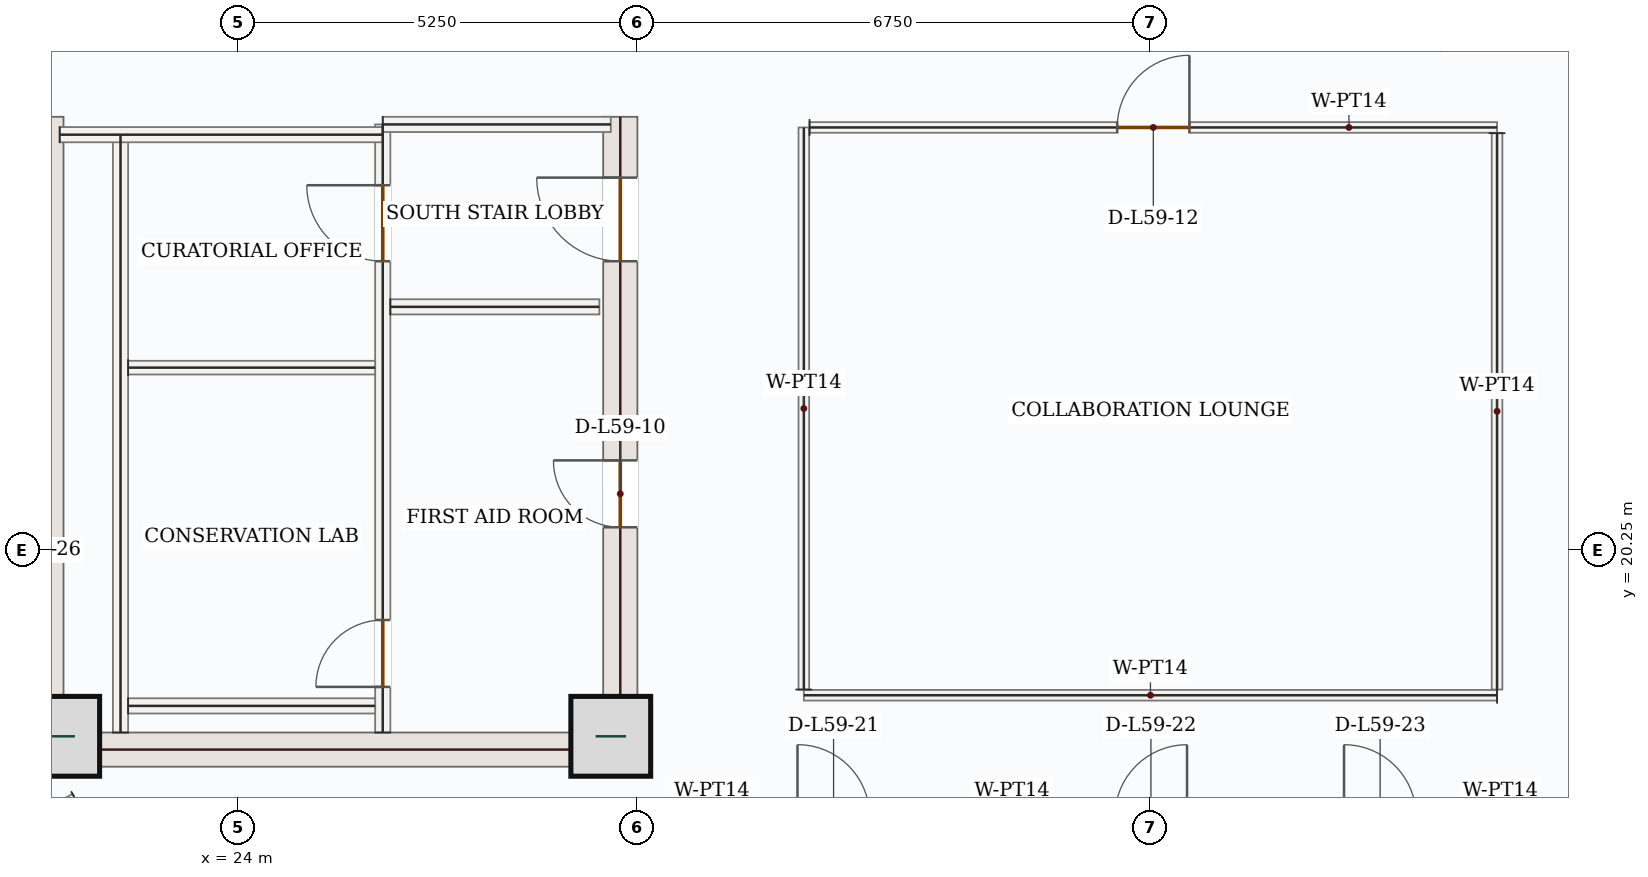
"""IFC4 building model, lengths in metres.
Left out: names, types, materials, properties, quantities, classifications, styles, units other than length and angle.
Written with IfcOpenShell. Run it as: python <this file> out.ifc"""

import sys

from ifc_helpers import new_model, si_unit, direction, frame, frame_2d, origin, origin_2d, place, context, subcontext, project, spatial, rectangle, extrude, source, transform, mapped, element, fill, save


model = new_model("IFC4")
c1 = context("Model", 3, precision=1e-05, world=origin(), true_north=direction((0.0, 1.0)))
c2 = subcontext(c1, "Body", "Model", "MODEL_VIEW")
j1 = project(units=[si_unit("LENGTHUNIT", "METRE"), si_unit("PLANEANGLEUNIT", "RADIAN")], contexts=[c1])
p1 = place(None, origin())
s1 = spatial("IfcSite", under=j1, at=p1, CompositionType="ELEMENT")
p2 = place(p1, origin())
s2 = spatial("IfcBuilding", under=s1, at=p2, CompositionType="ELEMENT")
p3 = place(p2, frame((0.0, 0.0, 250.35)))
s3 = spatial("IfcBuildingStorey", under=s2, at=p3, CompositionType="ELEMENT", Elevation=250.35)
m1 = source(origin(), c2, "Body", "SweptSolid", [
    extrude(rectangle(XDim=8.55, YDim=0.45, at=frame_2d((4.275, 0.0))), origin(), (0.0, 0.0, 1.0), 3.5),
])
p4 = place(p3, frame((21.475, 17.4, 0.0), z_axis=(0.0, 0.0, 1.0), x_axis=(0.0, 1.0, 0.0)))
e1 = element("IfcWall", 1, at=p4, inside=s3, PredefinedType="SHEAR", context=c2, shape_type="MappedRepresentation", body=[
    mapped(m1, transform((0.0, 0.0, 0.0), x_axis=(1.0, 0.0, 0.0), y_axis=(0.0, 1.0, 0.0), z_axis=(0.0, 0.0, 1.0), scale=1.0)),
])
p5 = place(p3, frame((29.025, 17.4, 0.0), z_axis=(0.0, 0.0, 1.0), x_axis=(0.0, 1.0, 0.0)))
e2 = element("IfcWall", 2, at=p5, inside=s3, PredefinedType="SHEAR", context=c2, shape_type="SweptSolid", body=[
    extrude(rectangle(XDim=8.55, YDim=0.45, at=frame_2d((4.275, 0.0))), origin(), (0.0, 0.0, 1.0), 3.5),
])
p6 = place(p5, frame((6.65, 0.0, 0.0)))
e3 = element("IfcOpeningElement", 3, at=p6, cuts=e2, PredefinedType="OPENING", context=c2, shape_type="SweptSolid", body=[
    extrude(rectangle(XDim=1.1, YDim=2.2, at=frame_2d((0.55, 1.1))), frame((0.0, 0.235, 0.0), z_axis=(0.0, -1.0, 0.0), x_axis=(1.0, 0.0, 0.0)), (0.0, 0.0, 1.0), 0.47),
])
p7 = place(p5, frame((3.15, 0.0, 0.0)))
e4 = element("IfcOpeningElement", 4, at=p7, cuts=e2, PredefinedType="OPENING", context=c2, shape_type="SweptSolid", body=[
    extrude(rectangle(XDim=0.88, YDim=2.1, at=frame_2d((0.44, 1.05))), frame((0.0, 0.235, 0.0), z_axis=(0.0, -1.0, 0.0), x_axis=(1.0, 0.0, 0.0)), (0.0, 0.0, 1.0), 0.47),
])
m2 = source(origin(), c2, "Body", "SweptSolid", [
    extrude(rectangle(XDim=7.1, YDim=0.45, at=frame_2d((3.55, 0.0))), origin(), (0.0, 0.0, 1.0), 3.5),
])
p8 = place(p3, frame((21.7, 17.625, 0.0), z_axis=(0.0, 0.0, 1.0), x_axis=(1.0, 0.0, 0.0)))
e5 = element("IfcWall", 5, at=p8, inside=s3, PredefinedType="SHEAR", context=c2, shape_type="MappedRepresentation", body=[
    mapped(m2, transform((0.0, 0.0, 0.0), x_axis=(1.0, 0.0, 0.0), y_axis=(0.0, 1.0, 0.0), z_axis=(0.0, 0.0, 1.0), scale=1.0)),
])
m3 = source(origin(), c2, "Body", "SweptSolid", [
    extrude(rectangle(XDim=1.05, YDim=1.05, at=origin_2d()), origin(), (0.0, 0.0, 1.0), 3.75),
])
for number, where, z_axis, x_axis in (
    (6, (21.65, 17.8, 0.0), (0.0, 0.0, 1.0), (1.0, 0.0, 0.0)),
    (7, (28.9, 17.8, 0.0), (0.0, 0.0, 1.0), (1.0, 0.0, 0.0)),
):
    element("IfcColumn", number, at=place(p3, frame(where, z_axis=z_axis, x_axis=x_axis)), inside=s3, PredefinedType="COLUMN", context=c2, shape_type="MappedRepresentation", body=[
        mapped(m3, transform((0.0, 0.0, 0.0), x_axis=(1.0, 0.0, 0.0), y_axis=(0.0, 1.0, 0.0), z_axis=(0.0, 0.0, 1.0), scale=1.0)),
    ])
m4 = source(origin(), c2, "Body", "SweptSolid", [
    extrude(rectangle(XDim=7.87, YDim=0.2, at=frame_2d((3.935, 0.0))), origin(), (0.0, 0.0, 1.0), 3.5),
])
p9 = place(p3, frame((22.45, 17.85, 0.0), z_axis=(0.0, 0.0, 1.0), x_axis=(0.0, 1.0, 0.0)))
e8 = element("IfcWall", 8, at=p9, inside=s3, PredefinedType="SOLIDWALL", context=c2, shape_type="MappedRepresentation", body=[
    mapped(m4, transform((0.0, 0.0, 0.0), x_axis=(1.0, 0.0, 0.0), y_axis=(0.0, 1.0, 0.0), z_axis=(0.0, 0.0, 1.0), scale=1.0)),
])
p10 = place(p3, frame((25.9, 17.85, 0.0), z_axis=(0.0, 0.0, 1.0), x_axis=(0.0, 1.0, 0.0)))
e9 = element("IfcWall", 9, at=p10, inside=s3, PredefinedType="SOLIDWALL", context=c2, shape_type="SweptSolid", body=[
    extrude(rectangle(XDim=8.0, YDim=0.2, at=frame_2d((4.0, 0.0))), origin(), (0.0, 0.0, 1.0), 3.5),
])
p11 = place(p10, frame((6.2, 0.0, 0.0)))
e10 = element("IfcOpeningElement", 10, at=p11, cuts=e9, PredefinedType="OPENING", context=c2, shape_type="SweptSolid", body=[
    extrude(rectangle(XDim=1.0, YDim=2.15, at=frame_2d((0.5, 1.075))), frame((0.0, 0.11, 0.0), z_axis=(0.0, -1.0, 0.0), x_axis=(1.0, 0.0, 0.0)), (0.0, 0.0, 1.0), 0.22),
])
p12 = place(p10, frame((0.6, 0.0, 0.0)))
e11 = element("IfcOpeningElement", 11, at=p12, cuts=e9, PredefinedType="OPENING", context=c2, shape_type="SweptSolid", body=[
    extrude(rectangle(XDim=0.88, YDim=2.1, at=frame_2d((0.44, 1.05))), frame((0.0, 0.11, 0.0), z_axis=(0.0, -1.0, 0.0), x_axis=(1.0, 0.0, 0.0)), (0.0, 0.0, 1.0), 0.22),
])
m5 = source(origin(), c2, "Body", "SweptSolid", [
    extrude(rectangle(XDim=4.25, YDim=0.2, at=frame_2d((2.125, 0.0))), origin(), (0.0, 0.0, 1.0), 3.5),
])
p13 = place(p3, frame((21.65, 25.715, 0.0), z_axis=(0.0, 0.0, 1.0), x_axis=(1.0, 0.0, 0.0)))
e12 = element("IfcWall", 12, at=p13, inside=s3, PredefinedType="SOLIDWALL", context=c2, shape_type="MappedRepresentation", body=[
    mapped(m5, transform((0.0, 0.0, 0.0), x_axis=(1.0, 0.0, 0.0), y_axis=(0.0, 1.0, 0.0), z_axis=(0.0, 0.0, 1.0), scale=1.0)),
])
m6 = source(origin(), c2, "Body", "SweptSolid", [
    extrude(rectangle(XDim=3.0, YDim=0.2, at=frame_2d((1.5, 0.0))), origin(), (0.0, 0.0, 1.0), 3.5),
])
p14 = place(p3, frame((25.9, 25.85, 0.0), z_axis=(0.0, 0.0, 1.0), x_axis=(1.0, 0.0, 0.0)))
e13 = element("IfcWall", 13, at=p14, inside=s3, PredefinedType="SOLIDWALL", context=c2, shape_type="MappedRepresentation", body=[
    mapped(m6, transform((0.0, 0.0, 0.0), x_axis=(1.0, 0.0, 0.0), y_axis=(0.0, 1.0, 0.0), z_axis=(0.0, 0.0, 1.0), scale=1.0)),
])
m7 = source(origin(), c2, "Body", "SweptSolid", [
    extrude(rectangle(XDim=3.25, YDim=0.2, at=frame_2d((1.625, 0.0))), origin(), (0.0, 0.0, 1.0), 3.5),
])
p15 = place(p3, frame((22.55, 18.2, 0.0), z_axis=(0.0, 0.0, 1.0), x_axis=(1.0, 0.0, 0.0)))
e14 = element("IfcWall", 14, at=p15, inside=s3, PredefinedType="SOLIDWALL", context=c2, shape_type="MappedRepresentation", body=[
    mapped(m7, transform((0.0, 0.0, 0.0), x_axis=(1.0, 0.0, 0.0), y_axis=(0.0, 1.0, 0.0), z_axis=(0.0, 0.0, 1.0), scale=1.0)),
])
m8 = source(origin(), c2, "Body", "SweptSolid", [
    extrude(rectangle(XDim=3.25, YDim=0.18, at=frame_2d((1.625, 0.0))), origin(), (0.0, 0.0, 1.0), 3.5),
])
p16 = place(p3, frame((22.55, 22.65, 0.0), z_axis=(0.0, 0.0, 1.0), x_axis=(1.0, 0.0, 0.0)))
e15 = element("IfcWall", 15, at=p16, inside=s3, PredefinedType="PARTITIONING", context=c2, shape_type="MappedRepresentation", body=[
    mapped(m8, transform((0.0, 0.0, 0.0), x_axis=(1.0, 0.0, 0.0), y_axis=(0.0, 1.0, 0.0), z_axis=(0.0, 0.0, 1.0), scale=1.0)),
])
m9 = source(origin(), c2, "Body", "SweptSolid", [
    extrude(rectangle(XDim=2.75, YDim=0.2, at=frame_2d((1.375, 0.0))), origin(), (0.0, 0.0, 1.0), 3.5),
])
p17 = place(p3, frame((26.0, 23.45, 0.0), z_axis=(0.0, 0.0, 1.0), x_axis=(1.0, 0.0, 0.0)))
e16 = element("IfcWall", 16, at=p17, inside=s3, PredefinedType="SOLIDWALL", context=c2, shape_type="MappedRepresentation", body=[
    mapped(m9, transform((0.0, 0.0, 0.0), x_axis=(1.0, 0.0, 0.0), y_axis=(0.0, 1.0, 0.0), z_axis=(0.0, 0.0, 1.0), scale=1.0)),
])
m10 = source(origin(), c2, "Body", "SweptSolid", [
    extrude(rectangle(XDim=4.695, YDim=0.14, at=frame_2d((2.348, 0.0))), origin(), (0.0, 0.0, 1.0), 3.5),
])
p18 = place(p3, frame((21.852, 16.98, 0.0), z_axis=(0.0, 0.0, 1.0), x_axis=(-0.877559526902, -0.479467701461, 0.0)))
e17 = element("IfcWall", 17, at=p18, inside=s3, PredefinedType="PARTITIONING", context=c2, shape_type="MappedRepresentation", body=[
    mapped(m10, transform((0.0, 0.0, 0.0), x_axis=(1.0, 0.0, 0.0), y_axis=(0.0, 1.0, 0.0), z_axis=(0.0, 0.0, 1.0), scale=1.0)),
])
m11 = source(origin(), c2, "Body", "SweptSolid", [
    extrude(rectangle(XDim=9.12, YDim=0.14, at=frame_2d((4.56, 0.0))), origin(), (0.0, 0.0, 1.0), 3.5),
])
p19 = place(p3, frame((40.56, 18.34, 0.0), z_axis=(0.0, 0.0, 1.0), x_axis=(-1.0, 0.0, 0.0)))
e18 = element("IfcWall", 18, at=p19, inside=s3, PredefinedType="PARTITIONING", context=c2, shape_type="MappedRepresentation", body=[
    mapped(m11, transform((0.0, 0.0, 0.0), x_axis=(1.0, 0.0, 0.0), y_axis=(0.0, 1.0, 0.0), z_axis=(0.0, 0.0, 1.0), scale=1.0)),
])
m12 = source(origin(), c2, "Body", "SweptSolid", [
    extrude(rectangle(XDim=7.395, YDim=0.14, at=frame_2d((3.698, 0.0))), origin(), (0.0, 0.0, 1.0), 3.5),
])
p20 = place(p3, frame((31.44, 18.415, 0.0), z_axis=(0.0, 0.0, 1.0), x_axis=(0.0, 1.0, 0.0)))
e19 = element("IfcWall", 19, at=p20, inside=s3, PredefinedType="PARTITIONING", context=c2, shape_type="MappedRepresentation", body=[
    mapped(m12, transform((0.0, 0.0, 0.0), x_axis=(1.0, 0.0, 0.0), y_axis=(0.0, 1.0, 0.0), z_axis=(0.0, 0.0, 1.0), scale=1.0)),
])
p21 = place(p3, frame((31.515, 25.81, 0.0), z_axis=(0.0, 0.0, 1.0), x_axis=(1.0, 0.0, 0.0)))
e20 = element("IfcWall", 20, at=p21, inside=s3, PredefinedType="PARTITIONING", context=c2, shape_type="SweptSolid", body=[
    extrude(rectangle(XDim=9.045, YDim=0.14, at=frame_2d((4.522, 0.0))), origin(), (0.0, 0.0, 1.0), 3.5),
])
p22 = place(p21, frame((4.048, 0.0, 0.0)))
e21 = element("IfcOpeningElement", 21, at=p22, cuts=e20, PredefinedType="OPENING", context=c2, shape_type="SweptSolid", body=[
    extrude(rectangle(XDim=0.95, YDim=2.15, at=frame_2d((0.475, 1.075))), frame((0.0, 0.08, 0.0), z_axis=(0.0, -1.0, 0.0), x_axis=(1.0, 0.0, 0.0)), (0.0, 0.0, 1.0), 0.16),
])
m13 = source(origin(), c2, "Body", "SweptSolid", [
    extrude(rectangle(XDim=7.32, YDim=0.14, at=frame_2d((3.66, 0.0))), origin(), (0.0, 0.0, 1.0), 3.5),
])
p23 = place(p3, frame((40.56, 25.735, 0.0), z_axis=(0.0, 0.0, 1.0), x_axis=(0.0, -1.0, 0.0)))
e22 = element("IfcWall", 22, at=p23, inside=s3, PredefinedType="PARTITIONING", context=c2, shape_type="MappedRepresentation", body=[
    mapped(m13, transform((0.0, 0.0, 0.0), x_axis=(1.0, 0.0, 0.0), y_axis=(0.0, 1.0, 0.0), z_axis=(0.0, 0.0, 1.0), scale=1.0)),
])
m14 = source(origin(), c2, "Body", "SweptSolid", [
    extrude(rectangle(XDim=1.0, YDim=2.15, at=frame_2d((0.5, 1.075))), frame((0.0, 0.025, 0.0), z_axis=(0.0, -1.0, 0.0), x_axis=(1.0, 0.0, 0.0)), (0.0, 0.0, 1.0), 0.05),
])
p24 = place(p11, origin())
e23 = element("IfcDoor", 23, at=p24, inside=s3, OperationType="SINGLE_SWING_RIGHT", PredefinedType="DOOR", context=c2, shape_type="MappedRepresentation", body=[
    mapped(m14, transform((0.0, 0.0, 0.0), x_axis=(1.0, 0.0, 0.0), y_axis=(0.0, 1.0, 0.0), z_axis=(0.0, 0.0, 1.0), scale=1.0)),
])
fill(e10, e23)
m15 = source(origin(), c2, "Body", "SweptSolid", [
    extrude(rectangle(XDim=0.88, YDim=2.1, at=frame_2d((0.44, 1.05))), frame((0.0, 0.025, 0.0), z_axis=(0.0, -1.0, 0.0), x_axis=(1.0, 0.0, 0.0)), (0.0, 0.0, 1.0), 0.05),
])
p25 = place(p12, origin())
e24 = element("IfcDoor", 24, at=p25, inside=s3, OperationType="SINGLE_SWING_LEFT", PredefinedType="DOOR", context=c2, shape_type="MappedRepresentation", body=[
    mapped(m15, transform((0.0, 0.0, 0.0), x_axis=(1.0, 0.0, 0.0), y_axis=(0.0, 1.0, 0.0), z_axis=(0.0, 0.0, 1.0), scale=1.0)),
])
fill(e11, e24)
m16 = source(origin(), c2, "Body", "SweptSolid", [
    extrude(rectangle(XDim=1.1, YDim=2.2, at=frame_2d((0.55, 1.1))), frame((0.0, 0.025, 0.0), z_axis=(0.0, -1.0, 0.0), x_axis=(1.0, 0.0, 0.0)), (0.0, 0.0, 1.0), 0.05),
])
p26 = place(p6, origin())
e25 = element("IfcDoor", 25, at=p26, inside=s3, OperationType="SINGLE_SWING_RIGHT", PredefinedType="DOOR", context=c2, shape_type="MappedRepresentation", body=[
    mapped(m16, transform((0.0, 0.0, 0.0), x_axis=(1.0, 0.0, 0.0), y_axis=(0.0, 1.0, 0.0), z_axis=(0.0, 0.0, 1.0), scale=1.0)),
])
fill(e3, e25)
p27 = place(p7, origin())
e26 = element("IfcDoor", 26, at=p27, inside=s3, OperationType="SINGLE_SWING_RIGHT", PredefinedType="DOOR", context=c2, shape_type="MappedRepresentation", body=[
    mapped(m15, transform((0.0, 0.0, 0.0), x_axis=(1.0, 0.0, 0.0), y_axis=(0.0, 1.0, 0.0), z_axis=(0.0, 0.0, 1.0), scale=1.0)),
])
fill(e4, e26)
m17 = source(origin(), c2, "Body", "SweptSolid", [
    extrude(rectangle(XDim=0.95, YDim=2.15, at=frame_2d((0.475, 1.075))), frame((0.0, 0.025, 0.0), z_axis=(0.0, -1.0, 0.0), x_axis=(1.0, 0.0, 0.0)), (0.0, 0.0, 1.0), 0.05),
])
p28 = place(p22, origin())
e27 = element("IfcDoor", 27, at=p28, inside=s3, OperationType="SINGLE_SWING_RIGHT", PredefinedType="DOOR", context=c2, shape_type="MappedRepresentation", body=[
    mapped(m17, transform((0.0, 0.0, 0.0), x_axis=(1.0, 0.0, 0.0), y_axis=(0.0, 1.0, 0.0), z_axis=(0.0, 0.0, 1.0), scale=1.0)),
])
fill(e21, e27)
save(model, sys.argv[1])
